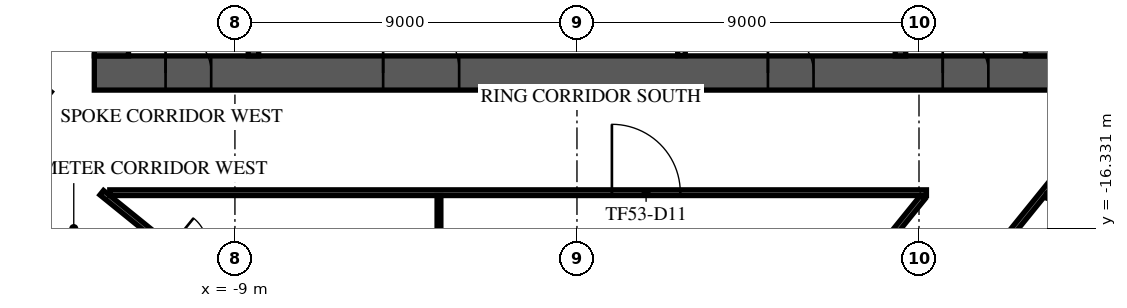
"""IFC4 building model, lengths in metres.
Left out: names, types, materials, properties, quantities, classifications, styles, units other than length and angle.
Written with IfcOpenShell. Run it as: python <this file> out.ifc"""

import sys

from ifc_helpers import new_model, si_unit, direction, frame, frame_2d, origin, place, context, subcontext, project, spatial, rectangle, extrude, element, fill, save


model = new_model("IFC4")
c1 = context("Model", 3, precision=1e-05, world=origin(), true_north=direction((0.0, 1.0)))
c2 = subcontext(c1, "Body", "Model", "MODEL_VIEW")
j1 = project(units=[si_unit("LENGTHUNIT", "METRE"), si_unit("PLANEANGLEUNIT", "RADIAN")], contexts=[c1])
p1 = place(None, origin())
s1 = spatial("IfcSite", under=j1, at=p1, CompositionType="ELEMENT")
p2 = place(p1, origin())
s2 = spatial("IfcBuilding", under=s1, at=p2, CompositionType="ELEMENT")
p3 = place(p2, frame((0.0, 0.0, 225.3)))
s3 = spatial("IfcBuildingStorey", under=s2, at=p3, CompositionType="ELEMENT", Elevation=225.3)
p4 = place(p3, frame((-12.7, -12.25, 0.0), z_axis=(0.0, 0.0, 1.0), x_axis=(1.0, 0.0, 0.0)))
e1 = element("IfcWall", 1, at=p4, inside=s3, PredefinedType="SHEAR", context=c2, shape_type="SweptSolid", body=[
    extrude(rectangle(XDim=25.4, YDim=0.9, at=frame_2d((12.7, 0.0))), origin(), (0.0, 0.0, 1.0), 3.62),
])
p5 = place(p4, frame((7.6, 0.0, 0.0)))
e2 = element("IfcOpeningElement", 2, at=p5, cuts=e1, PredefinedType="OPENING", context=c2, shape_type="SweptSolid", body=[
    extrude(rectangle(XDim=2.0, YDim=2.1, at=frame_2d((1.0, 1.05))), frame((0.0, 0.46, 0.0), z_axis=(0.0, -1.0, 0.0), x_axis=(1.0, 0.0, 0.0)), (0.0, 0.0, 1.0), 0.92),
])
p6 = place(p4, frame((17.725, 0.0, 0.0)))
e3 = element("IfcOpeningElement", 3, at=p6, cuts=e1, PredefinedType="OPENING", context=c2, shape_type="SweptSolid", body=[
    extrude(rectangle(XDim=1.2, YDim=2.1, at=frame_2d((0.6, 1.05))), frame((0.0, 0.46, 0.0), z_axis=(0.0, -1.0, 0.0), x_axis=(1.0, 0.0, 0.0)), (0.0, 0.0, 1.0), 0.92),
])
p7 = place(p4, frame((1.875, 0.0, 0.0)))
e4 = element("IfcOpeningElement", 4, at=p7, cuts=e1, PredefinedType="OPENING", context=c2, shape_type="SweptSolid", body=[
    extrude(rectangle(XDim=1.2, YDim=2.1, at=frame_2d((0.6, 1.05))), frame((0.0, 0.46, 0.0), z_axis=(0.0, -1.0, 0.0), x_axis=(1.0, 0.0, 0.0)), (0.0, 0.0, 1.0), 0.92),
])
p8 = place(p4, frame((22.325, 0.0, 0.0)))
e5 = element("IfcOpeningElement", 5, at=p8, cuts=e1, PredefinedType="OPENING", context=c2, shape_type="SweptSolid", body=[
    extrude(rectangle(XDim=1.2, YDim=2.1, at=frame_2d((0.6, 1.05))), frame((0.0, 0.46, 0.0), z_axis=(0.0, -1.0, 0.0), x_axis=(1.0, 0.0, 0.0)), (0.0, 0.0, 1.0), 0.92),
])
p9 = place(p3, frame((12.25, -11.8, 0.0), z_axis=(0.0, 0.0, 1.0), x_axis=(0.0, 1.0, 0.0)))
e6 = element("IfcWall", 6, at=p9, inside=s3, PredefinedType="SHEAR", context=c2, shape_type="SweptSolid", body=[
    extrude(rectangle(XDim=23.6, YDim=0.9, at=frame_2d((11.8, 0.0))), origin(), (0.0, 0.0, 1.0), 3.62),
])
p10 = place(p9, frame((10.6, 0.0, 0.0)))
e7 = element("IfcOpeningElement", 7, at=p10, cuts=e6, PredefinedType="OPENING", context=c2, shape_type="SweptSolid", body=[
    extrude(rectangle(XDim=2.4, YDim=2.4, at=frame_2d((1.2, 1.2))), frame((0.0, 0.46, 0.0), z_axis=(0.0, -1.0, 0.0), x_axis=(1.0, 0.0, 0.0)), (0.0, 0.0, 1.0), 0.92),
])
p11 = place(p3, frame((-12.25, -11.8, 0.0), z_axis=(0.0, 0.0, 1.0), x_axis=(0.0, 1.0, 0.0)))
e8 = element("IfcWall", 8, at=p11, inside=s3, PredefinedType="SHEAR", context=c2, shape_type="SweptSolid", body=[
    extrude(rectangle(XDim=23.6, YDim=0.9, at=frame_2d((11.8, 0.0))), origin(), (0.0, 0.0, 1.0), 3.62),
])
p12 = place(p11, frame((10.6, 0.0, 0.0)))
e9 = element("IfcOpeningElement", 9, at=p12, cuts=e8, PredefinedType="OPENING", context=c2, shape_type="SweptSolid", body=[
    extrude(rectangle(XDim=2.4, YDim=2.4, at=frame_2d((1.2, 1.2))), frame((0.0, 0.46, 0.0), z_axis=(0.0, -1.0, 0.0), x_axis=(1.0, 0.0, 0.0)), (0.0, 0.0, 1.0), 0.92),
])
p13 = place(p3, frame((-8.512, -4.55, 0.0), z_axis=(0.0, 0.0, 1.0), x_axis=(0.0, -1.0, 0.0)))
e10 = element("IfcWall", 10, at=p13, inside=s3, PredefinedType="SOLIDWALL", context=c2, shape_type="SweptSolid", body=[
    extrude(rectangle(XDim=7.25, YDim=0.275, at=frame_2d((3.625, 0.0))), origin(), (0.0, 0.0, 1.0), 3.62),
])
p14 = place(p13, frame((6.0, 0.0, 0.0)))
e11 = element("IfcOpeningElement", 11, at=p14, cuts=e10, PredefinedType="OPENING", context=c2, shape_type="SweptSolid", body=[
    extrude(rectangle(XDim=1.0, YDim=2.1, at=frame_2d((0.5, 1.05))), frame((0.0, 0.147, 0.0), z_axis=(0.0, -1.0, 0.0), x_axis=(1.0, 0.0, 0.0)), (0.0, 0.0, 1.0), 0.295),
])
p15 = place(p3, frame((8.512, -4.55, 0.0), z_axis=(0.0, 0.0, 1.0), x_axis=(0.0, -1.0, 0.0)))
e12 = element("IfcWall", 12, at=p15, inside=s3, PredefinedType="SOLIDWALL", context=c2, shape_type="SweptSolid", body=[
    extrude(rectangle(XDim=7.25, YDim=0.275, at=frame_2d((3.625, 0.0))), origin(), (0.0, 0.0, 1.0), 3.62),
])
p16 = place(p15, frame((6.0, 0.0, 0.0)))
e13 = element("IfcOpeningElement", 13, at=p16, cuts=e12, PredefinedType="OPENING", context=c2, shape_type="SweptSolid", body=[
    extrude(rectangle(XDim=1.0, YDim=2.1, at=frame_2d((0.5, 1.05))), frame((0.0, 0.147, 0.0), z_axis=(0.0, -1.0, 0.0), x_axis=(1.0, 0.0, 0.0)), (0.0, 0.0, 1.0), 0.295),
])
p17 = place(p3, frame((2.75, -11.795, 0.0), z_axis=(0.0, 0.0, 1.0), x_axis=(0.0, 1.0, 0.0)))
e14 = element("IfcWall", 14, at=p17, inside=s3, PredefinedType="PARTITIONING", context=c2, shape_type="SweptSolid", body=[
    extrude(rectangle(XDim=2.99, YDim=0.2, at=frame_2d((1.495, 0.0))), origin(), (0.0, 0.0, 1.0), 3.62),
])
p18 = place(p3, frame((-33.845, -10.81, 0.0), z_axis=(0.0, 0.0, 1.0), x_axis=(0.777145437972, -0.629321037499, 0.0)))
e15 = element("IfcWall", 15, at=p18, inside=s3, PredefinedType="STANDARD", context=c2, shape_type="SweptSolid", body=[
    extrude(rectangle(XDim=39.0, YDim=0.6, at=frame_2d((19.5, 0.0))), origin(), (0.0, 0.0, 1.0), 3.62),
])
p19 = place(p18, frame((1.217, 0.0, 0.9)))
e16 = element("IfcOpeningElement", 16, at=p19, cuts=e15, PredefinedType="OPENING", context=c2, shape_type="SweptSolid", body=[
    extrude(rectangle(XDim=1.9, YDim=2.1, at=frame_2d((0.95, 1.05))), frame((0.0, 0.31, 0.0), z_axis=(0.0, -1.0, 0.0), x_axis=(1.0, 0.0, 0.0)), (0.0, 0.0, 1.0), 0.62),
])
p20 = place(p18, frame((5.55, 0.0, 0.9)))
e17 = element("IfcOpeningElement", 17, at=p20, cuts=e15, PredefinedType="OPENING", context=c2, shape_type="SweptSolid", body=[
    extrude(rectangle(XDim=1.9, YDim=2.1, at=frame_2d((0.95, 1.05))), frame((0.0, 0.31, 0.0), z_axis=(0.0, -1.0, 0.0), x_axis=(1.0, 0.0, 0.0)), (0.0, 0.0, 1.0), 0.62),
])
p21 = place(p18, frame((9.883, 0.0, 0.9)))
e18 = element("IfcOpeningElement", 18, at=p21, cuts=e15, PredefinedType="OPENING", context=c2, shape_type="SweptSolid", body=[
    extrude(rectangle(XDim=1.9, YDim=2.1, at=frame_2d((0.95, 1.05))), frame((0.0, 0.31, 0.0), z_axis=(0.0, -1.0, 0.0), x_axis=(1.0, 0.0, 0.0)), (0.0, 0.0, 1.0), 0.62),
])
p22 = place(p18, frame((14.217, 0.0, 0.9)))
e19 = element("IfcOpeningElement", 19, at=p22, cuts=e15, PredefinedType="OPENING", context=c2, shape_type="SweptSolid", body=[
    extrude(rectangle(XDim=1.9, YDim=2.1, at=frame_2d((0.95, 1.05))), frame((0.0, 0.31, 0.0), z_axis=(0.0, -1.0, 0.0), x_axis=(1.0, 0.0, 0.0)), (0.0, 0.0, 1.0), 0.62),
])
p23 = place(p18, frame((18.55, 0.0, 0.9)))
e20 = element("IfcOpeningElement", 20, at=p23, cuts=e15, PredefinedType="OPENING", context=c2, shape_type="SweptSolid", body=[
    extrude(rectangle(XDim=1.9, YDim=2.1, at=frame_2d((0.95, 1.05))), frame((0.0, 0.31, 0.0), z_axis=(0.0, -1.0, 0.0), x_axis=(1.0, 0.0, 0.0)), (0.0, 0.0, 1.0), 0.62),
])
p24 = place(p18, frame((22.883, 0.0, 0.9)))
e21 = element("IfcOpeningElement", 21, at=p24, cuts=e15, PredefinedType="OPENING", context=c2, shape_type="SweptSolid", body=[
    extrude(rectangle(XDim=1.9, YDim=2.1, at=frame_2d((0.95, 1.05))), frame((0.0, 0.31, 0.0), z_axis=(0.0, -1.0, 0.0), x_axis=(1.0, 0.0, 0.0)), (0.0, 0.0, 1.0), 0.62),
])
p25 = place(p18, frame((27.217, 0.0, 0.9)))
e22 = element("IfcOpeningElement", 22, at=p25, cuts=e15, PredefinedType="OPENING", context=c2, shape_type="SweptSolid", body=[
    extrude(rectangle(XDim=1.9, YDim=2.1, at=frame_2d((0.95, 1.05))), frame((0.0, 0.31, 0.0), z_axis=(0.0, -1.0, 0.0), x_axis=(1.0, 0.0, 0.0)), (0.0, 0.0, 1.0), 0.62),
])
p26 = place(p18, frame((31.55, 0.0, 0.9)))
e23 = element("IfcOpeningElement", 23, at=p26, cuts=e15, PredefinedType="OPENING", context=c2, shape_type="SweptSolid", body=[
    extrude(rectangle(XDim=1.9, YDim=2.1, at=frame_2d((0.95, 1.05))), frame((0.0, 0.31, 0.0), z_axis=(0.0, -1.0, 0.0), x_axis=(1.0, 0.0, 0.0)), (0.0, 0.0, 1.0), 0.62),
])
p27 = place(p18, frame((35.883, 0.0, 0.9)))
e24 = element("IfcOpeningElement", 24, at=p27, cuts=e15, PredefinedType="OPENING", context=c2, shape_type="SweptSolid", body=[
    extrude(rectangle(XDim=1.9, YDim=2.1, at=frame_2d((0.95, 1.05))), frame((0.0, 0.31, 0.0), z_axis=(0.0, -1.0, 0.0), x_axis=(1.0, 0.0, 0.0)), (0.0, 0.0, 1.0), 0.62),
])
p28 = place(p3, frame((3.777, -34.584, 0.0), z_axis=(0.0, 0.0, 1.0), x_axis=(0.629323778295, 0.777143218508, 0.0)))
e25 = element("IfcWall", 25, at=p28, inside=s3, PredefinedType="STANDARD", context=c2, shape_type="SweptSolid", body=[
    extrude(rectangle(XDim=49.0, YDim=0.6, at=frame_2d((24.5, 0.0))), origin(), (0.0, 0.0, 1.0), 3.62),
])
p29 = place(p28, frame((1.227, 0.0, 0.9)))
e26 = element("IfcOpeningElement", 26, at=p29, cuts=e25, PredefinedType="OPENING", context=c2, shape_type="SweptSolid", body=[
    extrude(rectangle(XDim=2.0, YDim=2.1, at=frame_2d((1.0, 1.05))), frame((0.0, 0.31, 0.0), z_axis=(0.0, -1.0, 0.0), x_axis=(1.0, 0.0, 0.0)), (0.0, 0.0, 1.0), 0.62),
])
p30 = place(p28, frame((5.682, 0.0, 0.9)))
e27 = element("IfcOpeningElement", 27, at=p30, cuts=e25, PredefinedType="OPENING", context=c2, shape_type="SweptSolid", body=[
    extrude(rectangle(XDim=2.0, YDim=2.1, at=frame_2d((1.0, 1.05))), frame((0.0, 0.31, 0.0), z_axis=(0.0, -1.0, 0.0), x_axis=(1.0, 0.0, 0.0)), (0.0, 0.0, 1.0), 0.62),
])
p31 = place(p28, frame((10.136, 0.0, 0.9)))
e28 = element("IfcOpeningElement", 28, at=p31, cuts=e25, PredefinedType="OPENING", context=c2, shape_type="SweptSolid", body=[
    extrude(rectangle(XDim=2.0, YDim=2.1, at=frame_2d((1.0, 1.05))), frame((0.0, 0.31, 0.0), z_axis=(0.0, -1.0, 0.0), x_axis=(1.0, 0.0, 0.0)), (0.0, 0.0, 1.0), 0.62),
])
p32 = place(p28, frame((14.591, 0.0, 0.9)))
e29 = element("IfcOpeningElement", 29, at=p32, cuts=e25, PredefinedType="OPENING", context=c2, shape_type="SweptSolid", body=[
    extrude(rectangle(XDim=2.0, YDim=2.1, at=frame_2d((1.0, 1.05))), frame((0.0, 0.31, 0.0), z_axis=(0.0, -1.0, 0.0), x_axis=(1.0, 0.0, 0.0)), (0.0, 0.0, 1.0), 0.62),
])
p33 = place(p28, frame((19.045, 0.0, 0.9)))
e30 = element("IfcOpeningElement", 30, at=p33, cuts=e25, PredefinedType="OPENING", context=c2, shape_type="SweptSolid", body=[
    extrude(rectangle(XDim=2.0, YDim=2.1, at=frame_2d((1.0, 1.05))), frame((0.0, 0.31, 0.0), z_axis=(0.0, -1.0, 0.0), x_axis=(1.0, 0.0, 0.0)), (0.0, 0.0, 1.0), 0.62),
])
p34 = place(p28, frame((23.5, 0.0, 0.9)))
e31 = element("IfcOpeningElement", 31, at=p34, cuts=e25, PredefinedType="OPENING", context=c2, shape_type="SweptSolid", body=[
    extrude(rectangle(XDim=2.0, YDim=2.1, at=frame_2d((1.0, 1.05))), frame((0.0, 0.31, 0.0), z_axis=(0.0, -1.0, 0.0), x_axis=(1.0, 0.0, 0.0)), (0.0, 0.0, 1.0), 0.62),
])
p35 = place(p28, frame((27.955, 0.0, 0.9)))
e32 = element("IfcOpeningElement", 32, at=p35, cuts=e25, PredefinedType="OPENING", context=c2, shape_type="SweptSolid", body=[
    extrude(rectangle(XDim=2.0, YDim=2.1, at=frame_2d((1.0, 1.05))), frame((0.0, 0.31, 0.0), z_axis=(0.0, -1.0, 0.0), x_axis=(1.0, 0.0, 0.0)), (0.0, 0.0, 1.0), 0.62),
])
p36 = place(p28, frame((32.409, 0.0, 0.9)))
e33 = element("IfcOpeningElement", 33, at=p36, cuts=e25, PredefinedType="OPENING", context=c2, shape_type="SweptSolid", body=[
    extrude(rectangle(XDim=2.0, YDim=2.1, at=frame_2d((1.0, 1.05))), frame((0.0, 0.31, 0.0), z_axis=(0.0, -1.0, 0.0), x_axis=(1.0, 0.0, 0.0)), (0.0, 0.0, 1.0), 0.62),
])
p37 = place(p28, frame((36.864, 0.0, 0.9)))
e34 = element("IfcOpeningElement", 34, at=p37, cuts=e25, PredefinedType="OPENING", context=c2, shape_type="SweptSolid", body=[
    extrude(rectangle(XDim=2.0, YDim=2.1, at=frame_2d((1.0, 1.05))), frame((0.0, 0.31, 0.0), z_axis=(0.0, -1.0, 0.0), x_axis=(1.0, 0.0, 0.0)), (0.0, 0.0, 1.0), 0.62),
])
p38 = place(p28, frame((41.318, 0.0, 0.9)))
e35 = element("IfcOpeningElement", 35, at=p38, cuts=e25, PredefinedType="OPENING", context=c2, shape_type="SweptSolid", body=[
    extrude(rectangle(XDim=2.0, YDim=2.1, at=frame_2d((1.0, 1.05))), frame((0.0, 0.31, 0.0), z_axis=(0.0, -1.0, 0.0), x_axis=(1.0, 0.0, 0.0)), (0.0, 0.0, 1.0), 0.62),
])
p39 = place(p28, frame((45.773, 0.0, 0.9)))
e36 = element("IfcOpeningElement", 36, at=p39, cuts=e25, PredefinedType="OPENING", context=c2, shape_type="SweptSolid", body=[
    extrude(rectangle(XDim=2.0, YDim=2.1, at=frame_2d((1.0, 1.05))), frame((0.0, 0.31, 0.0), z_axis=(0.0, -1.0, 0.0), x_axis=(1.0, 0.0, 0.0)), (0.0, 0.0, 1.0), 0.62),
])
p40 = place(p3, frame((-24.374, -8.878, 0.0), z_axis=(0.0, 0.0, 1.0), x_axis=(0.777132572121, -0.629336925143, 0.0)))
e37 = element("IfcWall", 37, at=p40, inside=s3, PredefinedType="PARTITIONING", context=c2, shape_type="SweptSolid", body=[
    extrude(rectangle(XDim=26.785, YDim=0.15, at=frame_2d((13.393, 0.0))), origin(), (0.0, 0.0, 1.0), 3.17),
])
p41 = place(p40, frame((1.3, 0.0, 0.0)))
e38 = element("IfcOpeningElement", 38, at=p41, cuts=e37, PredefinedType="OPENING", context=c2, shape_type="SweptSolid", body=[
    extrude(rectangle(XDim=1.0, YDim=2.1, at=frame_2d((0.5, 1.05))), frame((0.0, 0.085, 0.0), z_axis=(0.0, -1.0, 0.0), x_axis=(1.0, 0.0, 0.0)), (0.0, 0.0, 1.0), 0.17),
])
p42 = place(p40, frame((5.461, 0.0, 0.0)))
e39 = element("IfcOpeningElement", 39, at=p42, cuts=e37, PredefinedType="OPENING", context=c2, shape_type="SweptSolid", body=[
    extrude(rectangle(XDim=1.0, YDim=2.1, at=frame_2d((0.5, 1.05))), frame((0.0, 0.085, 0.0), z_axis=(0.0, -1.0, 0.0), x_axis=(1.0, 0.0, 0.0)), (0.0, 0.0, 1.0), 0.17),
])
p43 = place(p40, frame((11.587, 0.0, 0.0)))
e40 = element("IfcOpeningElement", 40, at=p43, cuts=e37, PredefinedType="OPENING", context=c2, shape_type="SweptSolid", body=[
    extrude(rectangle(XDim=1.0, YDim=2.1, at=frame_2d((0.5, 1.05))), frame((0.0, 0.085, 0.0), z_axis=(0.0, -1.0, 0.0), x_axis=(1.0, 0.0, 0.0)), (0.0, 0.0, 1.0), 0.17),
])
p44 = place(p3, frame((-12.505, -15.4, 0.0), z_axis=(0.0, 0.0, 1.0), x_axis=(0.77712909422, -0.629341219783, 0.0)))
e41 = element("IfcWall", 41, at=p44, inside=s3, PredefinedType="PARTITIONING", context=c2, shape_type="SweptSolid", body=[
    extrude(rectangle(XDim=13.457, YDim=0.15, at=frame_2d((6.729, 0.0))), origin(), (0.0, 0.0, 1.0), 3.17),
])
p45 = place(p44, frame((2.3, 0.0, 0.0)))
e42 = element("IfcOpeningElement", 42, at=p45, cuts=e41, PredefinedType="OPENING", context=c2, shape_type="SweptSolid", body=[
    extrude(rectangle(XDim=1.0, YDim=2.1, at=frame_2d((0.5, 1.05))), frame((0.0, 0.085, 0.0), z_axis=(0.0, -1.0, 0.0), x_axis=(1.0, 0.0, 0.0)), (0.0, 0.0, 1.0), 0.17),
])
p46 = place(p3, frame((-12.293, -15.4, 0.0), z_axis=(0.0, 0.0, 1.0), x_axis=(1.0, 0.0, 0.0)))
e43 = element("IfcWall", 43, at=p46, inside=s3, PredefinedType="PARTITIONING", context=c2, shape_type="SweptSolid", body=[
    extrude(rectangle(XDim=21.489, YDim=0.15, at=frame_2d((10.745, 0.0))), origin(), (0.0, 0.0, 1.0), 3.17),
])
p47 = place(p46, frame((13.212, 0.0, 0.0)))
e44 = element("IfcOpeningElement", 44, at=p47, cuts=e43, PredefinedType="OPENING", context=c2, shape_type="SweptSolid", body=[
    extrude(rectangle(XDim=1.8, YDim=2.1, at=frame_2d((0.9, 1.05))), frame((0.0, 0.085, 0.0), z_axis=(0.0, -1.0, 0.0), x_axis=(1.0, 0.0, 0.0)), (0.0, 0.0, 1.0), 0.17),
])
p48 = place(p3, frame((1.268, -25.191, 0.0), z_axis=(0.0, 0.0, 1.0), x_axis=(0.629298143895, 0.777163976321, 0.0)))
e45 = element("IfcWall", 45, at=p48, inside=s3, PredefinedType="PARTITIONING", context=c2, shape_type="SweptSolid", body=[
    extrude(rectangle(XDim=12.441, YDim=0.15, at=frame_2d((6.22, 0.0))), origin(), (0.0, 0.0, 1.0), 3.17),
])
p49 = place(p48, frame((6.55, 0.0, 0.0)))
e46 = element("IfcOpeningElement", 46, at=p49, cuts=e45, PredefinedType="OPENING", context=c2, shape_type="SweptSolid", body=[
    extrude(rectangle(XDim=1.0, YDim=2.1, at=frame_2d((0.5, 1.05))), frame((0.0, 0.085, 0.0), z_axis=(0.0, -1.0, 0.0), x_axis=(1.0, 0.0, 0.0)), (0.0, 0.0, 1.0), 0.17),
])
p50 = place(p3, frame((3.18, -26.643, 0.0), z_axis=(0.0, 0.0, 1.0), x_axis=(0.629322822444, 0.777143992547, 0.0)))
e47 = element("IfcWall", 47, at=p50, inside=s3, PredefinedType="PARTITIONING", context=c2, shape_type="SweptSolid", body=[
    extrude(rectangle(XDim=37.483, YDim=0.15, at=frame_2d((18.741, 0.0))), origin(), (0.0, 0.0, 1.0), 3.17),
])
p51 = place(p50, frame((6.346, 0.0, 0.0)))
e48 = element("IfcOpeningElement", 48, at=p51, cuts=e47, PredefinedType="OPENING", context=c2, shape_type="SweptSolid", body=[
    extrude(rectangle(XDim=1.0, YDim=2.1, at=frame_2d((0.5, 1.05))), frame((0.0, 0.085, 0.0), z_axis=(0.0, -1.0, 0.0), x_axis=(1.0, 0.0, 0.0)), (0.0, 0.0, 1.0), 0.17),
])
p52 = place(p50, frame((16.452, 0.0, 0.0)))
e49 = element("IfcOpeningElement", 49, at=p52, cuts=e47, PredefinedType="OPENING", context=c2, shape_type="SweptSolid", body=[
    extrude(rectangle(XDim=1.0, YDim=2.1, at=frame_2d((0.5, 1.05))), frame((0.0, 0.085, 0.0), z_axis=(0.0, -1.0, 0.0), x_axis=(1.0, 0.0, 0.0)), (0.0, 0.0, 1.0), 0.17),
])
p53 = place(p50, frame((23.4, 0.0, 0.0)))
e50 = element("IfcOpeningElement", 50, at=p53, cuts=e47, PredefinedType="OPENING", context=c2, shape_type="SweptSolid", body=[
    extrude(rectangle(XDim=1.0, YDim=2.1, at=frame_2d((0.5, 1.05))), frame((0.0, 0.085, 0.0), z_axis=(0.0, -1.0, 0.0), x_axis=(1.0, 0.0, 0.0)), (0.0, 0.0, 1.0), 0.17),
])
p54 = place(p3, frame((-3.631, -17.648, 0.0), z_axis=(0.0, 0.0, 1.0), x_axis=(0.0, 1.0, 0.0)))
e51 = element("IfcWall", 51, at=p54, inside=s3, PredefinedType="PARTITIONING", context=c2, shape_type="SweptSolid", body=[
    extrude(rectangle(XDim=2.173, YDim=0.1, at=frame_2d((1.086, 0.0))), origin(), (0.0, 0.0, 1.0), 3.62),
])
p55 = place(p3, frame((12.336, -15.482, 0.0), z_axis=(0.0, 0.0, 1.0), x_axis=(0.94462938415, -0.328139187845, 0.0)))
e52 = element("IfcWall", 52, at=p55, inside=s3, PredefinedType="PARTITIONING", context=c2, shape_type="SweptSolid", body=[
    extrude(rectangle(XDim=5.387, YDim=0.1, at=frame_2d((2.694, 0.0))), origin(), (0.0, 0.0, 1.0), 2.97),
])
p56 = place(p5, origin())
e53 = element("IfcDoor", 53, at=p56, inside=s3, OperationType="SINGLE_SWING_LEFT", PredefinedType="DOOR", context=c2, shape_type="SweptSolid", body=[
    extrude(rectangle(XDim=2.0, YDim=2.1, at=frame_2d((1.0, 1.05))), frame((0.0, 0.025, 0.0), z_axis=(0.0, -1.0, 0.0), x_axis=(1.0, 0.0, 0.0)), (0.0, 0.0, 1.0), 0.05),
])
fill(e2, e53)
p57 = place(p6, origin())
e54 = element("IfcDoor", 54, at=p57, inside=s3, OperationType="SINGLE_SWING_LEFT", PredefinedType="DOOR", context=c2, shape_type="SweptSolid", body=[
    extrude(rectangle(XDim=1.2, YDim=2.1, at=frame_2d((0.6, 1.05))), frame((0.0, 0.025, 0.0), z_axis=(0.0, -1.0, 0.0), x_axis=(1.0, 0.0, 0.0)), (0.0, 0.0, 1.0), 0.05),
])
fill(e3, e54)
p58 = place(p7, origin())
e55 = element("IfcDoor", 55, at=p58, inside=s3, OperationType="SINGLE_SWING_LEFT", PredefinedType="DOOR", context=c2, shape_type="SweptSolid", body=[
    extrude(rectangle(XDim=1.2, YDim=2.1, at=frame_2d((0.6, 1.05))), frame((0.0, 0.025, 0.0), z_axis=(0.0, -1.0, 0.0), x_axis=(1.0, 0.0, 0.0)), (0.0, 0.0, 1.0), 0.05),
])
fill(e4, e55)
p59 = place(p8, origin())
e56 = element("IfcDoor", 56, at=p59, inside=s3, OperationType="SINGLE_SWING_LEFT", PredefinedType="DOOR", context=c2, shape_type="SweptSolid", body=[
    extrude(rectangle(XDim=1.2, YDim=2.1, at=frame_2d((0.6, 1.05))), frame((0.0, 0.025, 0.0), z_axis=(0.0, -1.0, 0.0), x_axis=(1.0, 0.0, 0.0)), (0.0, 0.0, 1.0), 0.05),
])
fill(e5, e56)
p60 = place(p47, frame((1.8, 0.0, 0.0), z_axis=(0.0, 0.0, 1.0), x_axis=(-1.0, 0.0, 0.0)))
e57 = element("IfcDoor", 57, at=p60, inside=s3, OperationType="DOUBLE_DOOR_SINGLE_SWING", PredefinedType="DOOR", context=c2, shape_type="SweptSolid", body=[
    extrude(rectangle(XDim=1.8, YDim=2.1, at=frame_2d((0.9, 1.05))), frame((0.0, 0.025, 0.0), z_axis=(0.0, -1.0, 0.0), x_axis=(1.0, 0.0, 0.0)), (0.0, 0.0, 1.0), 0.05),
])
fill(e44, e57)
save(model, sys.argv[1])
